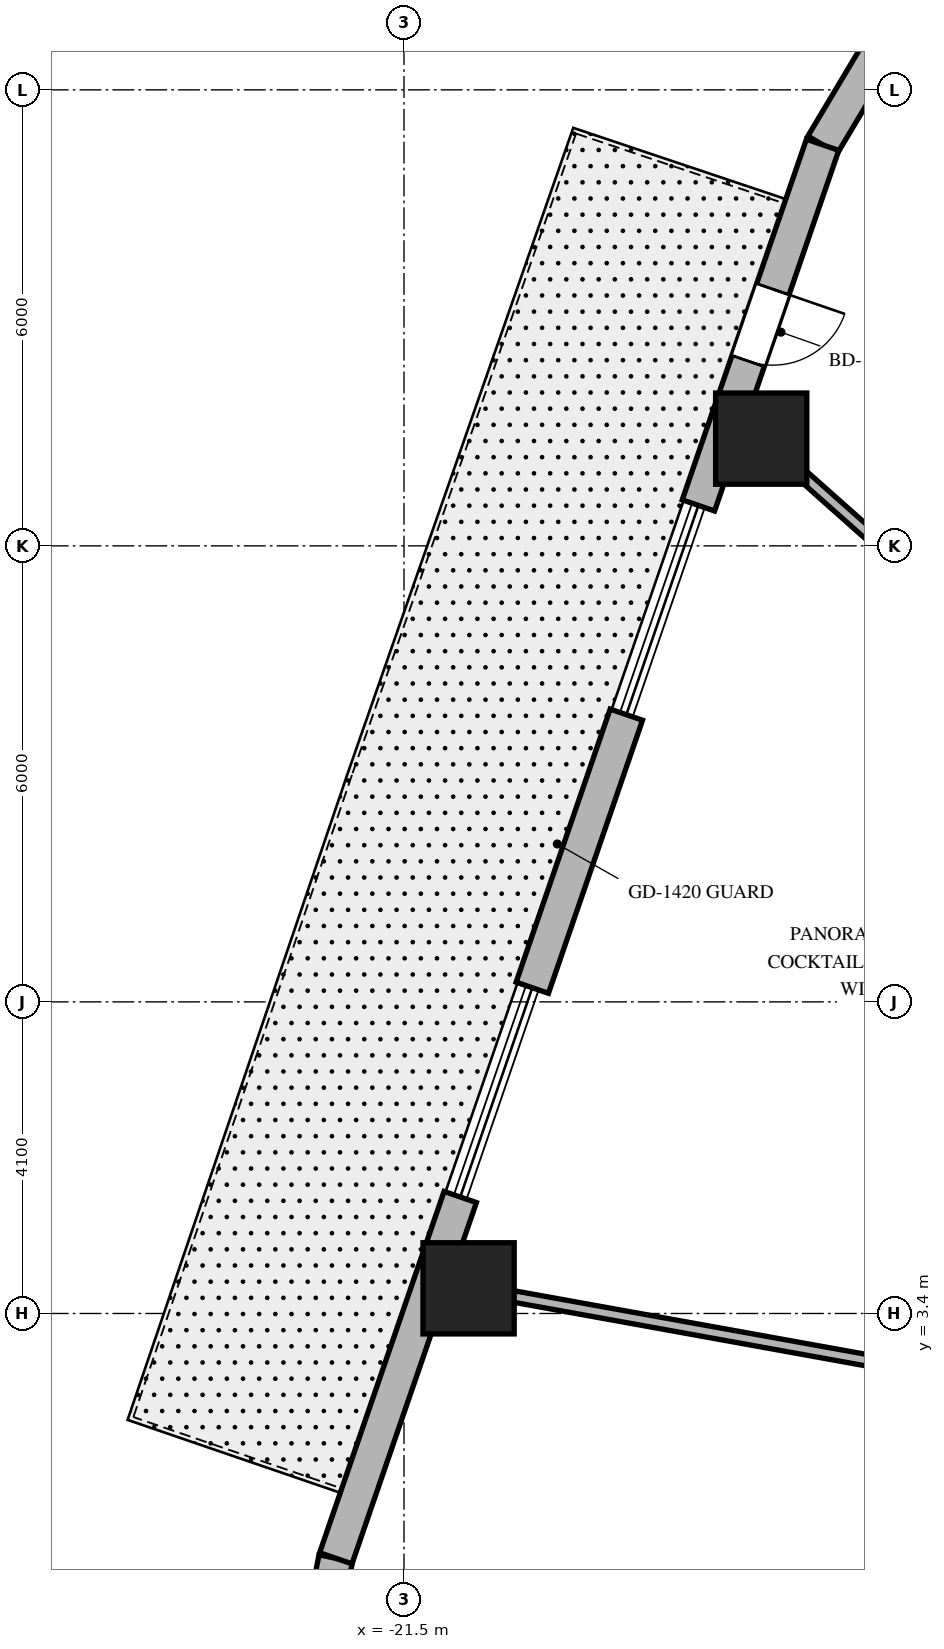
"""IFC4 building model, lengths in metres.
Left out: names, types, materials, properties, quantities, classifications, styles, units other than length and angle.
Written with IfcOpenShell. Run it as: python <this file> out.ifc"""

import sys

from ifc_helpers import new_model, si_unit, direction, frame, frame_2d, origin, origin_2d, place, context, subcontext, project, spatial, rectangle, extrude, element, fill, save


model = new_model("IFC4")
c1 = context("Model", 3, precision=1e-05, world=origin(), true_north=direction((0.0, 1.0)))
c2 = subcontext(c1, "Body", "Model", "MODEL_VIEW")
j1 = project(units=[si_unit("LENGTHUNIT", "METRE"), si_unit("PLANEANGLEUNIT", "RADIAN")], contexts=[c1])
p1 = place(None, origin())
s1 = spatial("IfcSite", under=j1, at=p1, CompositionType="ELEMENT")
p2 = place(p1, origin())
s2 = spatial("IfcBuilding", under=s1, at=p2, CompositionType="ELEMENT")
p3 = place(p2, frame((0.0, 0.0, 139.5)))
s3 = spatial("IfcBuildingStorey", under=s2, at=p3, CompositionType="ELEMENT", Elevation=139.5)
for number, where, z_axis, x_axis in (
    (1, (-16.8, 14.911, 0.0), (0.0, 0.0, 1.0), (1.0, 0.0, 0.0)),
    (2, (-20.65, 3.731, 0.0), (0.0, 0.0, 1.0), (1.0, 0.0, 0.0)),
):
    element("IfcColumn", number, at=place(p3, frame(where, z_axis=z_axis, x_axis=x_axis)), inside=s3, PredefinedType="COLUMN", context=c2, shape_type="SweptSolid", body=[
        extrude(rectangle(XDim=1.2, YDim=1.2, at=origin_2d()), origin(), (0.0, 0.0, 1.0), 4.8),
    ])
p4 = place(p3, frame((-15.272, 19.984, 0.0), z_axis=(0.0, 0.0, 1.0), x_axis=(-0.512579347361, -0.858639862025, 0.0)))
e3 = element("IfcWall", 3, at=p4, inside=s3, PredefinedType="SOLIDWALL", context=c2, shape_type="SweptSolid", body=[
    extrude(rectangle(XDim=1.406, YDim=0.45, at=frame_2d((0.703, 0.0))), origin(), (0.0, 0.0, 1.0), 4.5),
])
p5 = place(p3, frame((-22.397, 0.179, 0.0), z_axis=(0.0, 0.0, 1.0), x_axis=(-0.199313589404, -0.979935759669, 0.0)))
e4 = element("IfcWall", 4, at=p5, inside=s3, PredefinedType="SOLIDWALL", context=c2, shape_type="SweptSolid", body=[
    extrude(rectangle(XDim=0.896, YDim=0.45, at=frame_2d((0.448, 0.0))), origin(), (0.0, 0.0, 1.0), 4.5),
])
p6 = place(p3, frame((-15.992, 18.777, 0.0), z_axis=(0.0, 0.0, 1.0), x_axis=(-0.325626313688, -0.945498547769, 0.0)))
e5 = element("IfcWall", 5, at=p6, inside=s3, PredefinedType="SOLIDWALL", context=c2, shape_type="SweptSolid", body=[
    extrude(rectangle(XDim=5.018, YDim=0.45, at=frame_2d((2.509, 0.0))), origin(), (0.0, 0.0, 1.0), 4.5),
])
p7 = place(p6, frame((2.009, 0.0, 0.0)))
e6 = element("IfcOpeningElement", 6, at=p7, cuts=e5, PredefinedType="OPENING", context=c2, shape_type="SweptSolid", body=[
    extrude(rectangle(XDim=1.0, YDim=2.15, at=frame_2d((0.5, 1.075))), frame((0.0, 0.235, 0.0), z_axis=(0.0, -1.0, 0.0), x_axis=(1.0, 0.0, 0.0)), (0.0, 0.0, 1.0), 0.47),
])
p8 = place(p3, frame((-18.574, 11.279, 0.0), z_axis=(0.0, 0.0, 1.0), x_axis=(-0.325598625093, -0.945508083169, 0.0)))
e7 = element("IfcWall", 7, at=p8, inside=s3, PredefinedType="SOLIDWALL", context=c2, shape_type="SweptSolid", body=[
    extrude(rectangle(XDim=3.8, YDim=0.45, at=frame_2d((1.9, 0.0))), origin(), (0.0, 0.0, 1.0), 4.5),
])
p9 = place(p3, frame((-20.76, 4.933, 0.0), z_axis=(0.0, 0.0, 1.0), x_axis=(-0.325594073587, -0.94550965053, 0.0)))
e8 = element("IfcWall", 8, at=p9, inside=s3, PredefinedType="SOLIDWALL", context=c2, shape_type="SweptSolid", body=[
    extrude(rectangle(XDim=5.028, YDim=0.45, at=frame_2d((2.514, 0.0))), origin(), (0.0, 0.0, 1.0), 4.5),
])
p10 = place(p3, frame((-11.098, 9.85, 0.0), z_axis=(0.0, 0.0, 1.0), x_axis=(-0.747904295103, 0.663806572253, 0.0)))
e9 = element("IfcWall", 9, at=p10, inside=s3, PredefinedType="PARTITIONING", context=c2, shape_type="SweptSolid", body=[
    extrude(rectangle(XDim=8.16, YDim=0.15, at=frame_2d((4.08, 0.0))), origin(), (0.0, 0.0, 1.0), 2.69),
])
p11 = place(p3, frame((-11.35, 2.051, 0.0), z_axis=(0.0, 0.0, 1.0), x_axis=(-0.984068313063, 0.177790762484, 0.0)))
e10 = element("IfcWall", 10, at=p11, inside=s3, PredefinedType="PARTITIONING", context=c2, shape_type="SweptSolid", body=[
    extrude(rectangle(XDim=9.951, YDim=0.15, at=frame_2d((4.976, 0.0))), origin(), (0.0, 0.0, 1.0), 2.69),
])
p12 = place(p7, origin())
e11 = element("IfcDoor", 11, at=p12, inside=s3, OperationType="SINGLE_SWING_LEFT", PredefinedType="DOOR", context=c2, shape_type="SweptSolid", body=[
    extrude(rectangle(XDim=1.0, YDim=2.15, at=frame_2d((0.5, 1.075))), frame((0.0, 0.025, 0.0), z_axis=(0.0, -1.0, 0.0), x_axis=(1.0, 0.0, 0.0)), (0.0, 0.0, 1.0), 0.05),
])
fill(e6, e11)
save(model, sys.argv[1])
